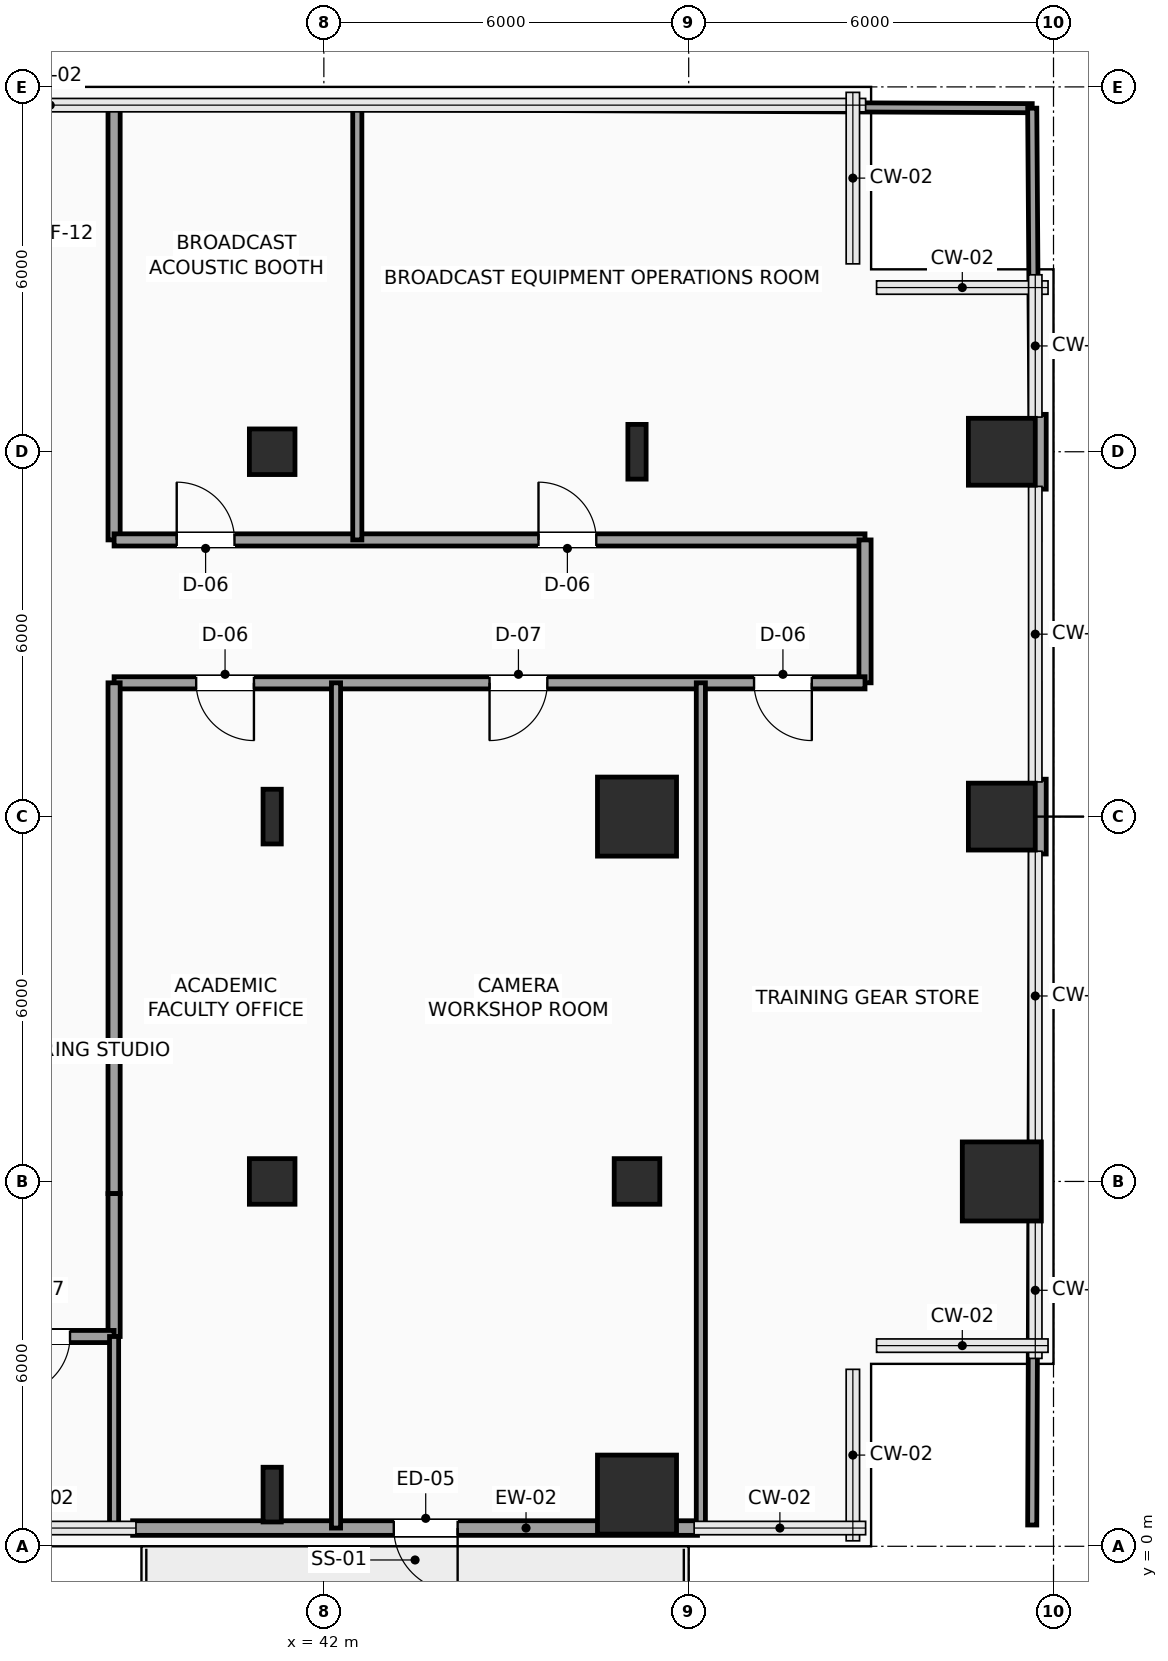
"""IFC4 building model, lengths in metres.
Left out: names, types, materials, properties, quantities, classifications, styles, units other than length and angle.
Written with IfcOpenShell. Run it as: python <this file> out.ifc"""

import sys

from ifc_helpers import new_model, si_unit, direction, frame, frame_2d, origin, origin_2d, place, context, subcontext, project, spatial, rectangle, hollow_rectangle, i_section, extrude, element, fill, save


model = new_model("IFC4")
c1 = context("Model", 3, precision=1e-05, world=origin(), true_north=direction((0.0, 1.0)))
c2 = subcontext(c1, "Body", "Model", "MODEL_VIEW")
j1 = project(units=[si_unit("LENGTHUNIT", "METRE"), si_unit("PLANEANGLEUNIT", "RADIAN")], contexts=[c1])
p1 = place(None, origin())
s1 = spatial("IfcSite", under=j1, at=p1, CompositionType="ELEMENT")
p2 = place(p1, origin())
s2 = spatial("IfcBuilding", under=s1, at=p2, CompositionType="ELEMENT")
p3 = place(p2, frame((0.0, 0.0, 59.7)))
s3 = spatial("IfcBuildingStorey", under=s2, at=p3, CompositionType="ELEMENT", Elevation=59.7)
p4 = place(p3, frame((41.15, 0.85, 0.0), z_axis=(0.0, 0.0, 1.0), x_axis=(1.0, 0.0, 0.0)))
e1 = element("IfcColumn", 1, at=p4, inside=s3, PredefinedType="COLUMN", context=c2, shape_type="SweptSolid", body=[
    extrude(i_section(OverallWidth=0.3, OverallDepth=0.9, WebThickness=0.019, FlangeThickness=0.035, FilletRadius=0.03, at=origin_2d()), origin(), (0.0, 0.0, 1.0), 3.9),
])
p5 = place(p3, frame((41.15, 6.0, 0.0), z_axis=(0.0, 0.0, 1.0), x_axis=(1.0, 0.0, 0.0)))
e2 = element("IfcColumn", 2, at=p5, inside=s3, PredefinedType="COLUMN", context=c2, shape_type="SweptSolid", body=[
    extrude(hollow_rectangle(XDim=0.75, YDim=0.75, WallThickness=0.035, InnerFilletRadius=0.035, OuterFilletRadius=0.05, at=origin_2d()), origin(), (0.0, 0.0, 1.0), 3.9),
])
p6 = place(p3, frame((41.15, 12.0, 0.0), z_axis=(0.0, 0.0, 1.0), x_axis=(1.0, 0.0, 0.0)))
e3 = element("IfcColumn", 3, at=p6, inside=s3, PredefinedType="COLUMN", context=c2, shape_type="SweptSolid", body=[
    extrude(i_section(OverallWidth=0.3, OverallDepth=0.9, WebThickness=0.019, FlangeThickness=0.035, FilletRadius=0.03, at=origin_2d()), origin(), (0.0, 0.0, 1.0), 3.9),
])
p7 = place(p3, frame((41.15, 18.0, 0.0), z_axis=(0.0, 0.0, 1.0), x_axis=(1.0, 0.0, 0.0)))
e4 = element("IfcColumn", 4, at=p7, inside=s3, PredefinedType="COLUMN", context=c2, shape_type="SweptSolid", body=[
    extrude(hollow_rectangle(XDim=0.75, YDim=0.75, WallThickness=0.035, InnerFilletRadius=0.035, OuterFilletRadius=0.05, at=origin_2d()), origin(), (0.0, 0.0, 1.0), 3.9),
])
p8 = place(p3, frame((47.15, 0.85, 0.0), z_axis=(0.0, 0.0, 1.0), x_axis=(1.0, 0.0, 0.0)))
e5 = element("IfcColumn", 5, at=p8, inside=s3, PredefinedType="COLUMN", context=c2, shape_type="SweptSolid", body=[
    extrude(rectangle(XDim=1.3, YDim=1.3, at=origin_2d()), origin(), (0.0, 0.0, 1.0), 3.9),
])
p9 = place(p3, frame((47.15, 6.0, 0.0), z_axis=(0.0, 0.0, 1.0), x_axis=(1.0, 0.0, 0.0)))
e6 = element("IfcColumn", 6, at=p9, inside=s3, PredefinedType="COLUMN", context=c2, shape_type="SweptSolid", body=[
    extrude(hollow_rectangle(XDim=0.75, YDim=0.75, WallThickness=0.035, InnerFilletRadius=0.035, OuterFilletRadius=0.05, at=origin_2d()), origin(), (0.0, 0.0, 1.0), 3.9),
])
p10 = place(p3, frame((47.15, 12.0, 0.0), z_axis=(0.0, 0.0, 1.0), x_axis=(1.0, 0.0, 0.0)))
e7 = element("IfcColumn", 7, at=p10, inside=s3, PredefinedType="COLUMN", context=c2, shape_type="SweptSolid", body=[
    extrude(rectangle(XDim=1.3, YDim=1.3, at=origin_2d()), origin(), (0.0, 0.0, 1.0), 3.9),
])
p11 = place(p3, frame((47.15, 18.0, 0.0), z_axis=(0.0, 0.0, 1.0), x_axis=(1.0, 0.0, 0.0)))
e8 = element("IfcColumn", 8, at=p11, inside=s3, PredefinedType="COLUMN", context=c2, shape_type="SweptSolid", body=[
    extrude(i_section(OverallWidth=0.3, OverallDepth=0.9, WebThickness=0.019, FlangeThickness=0.035, FilletRadius=0.03, at=origin_2d()), origin(), (0.0, 0.0, 1.0), 3.9),
])
p12 = place(p3, frame((53.15, 6.0, 0.0), z_axis=(0.0, 0.0, 1.0), x_axis=(1.0, 0.0, 0.0)))
e9 = element("IfcColumn", 9, at=p12, inside=s3, PredefinedType="COLUMN", context=c2, shape_type="SweptSolid", body=[
    extrude(rectangle(XDim=1.3, YDim=1.3, at=origin_2d()), origin(), (0.0, 0.0, 1.0), 3.9),
])
for number, where, z_axis, x_axis in (
    (10, (53.15, 12.0, 0.0), (0.0, 0.0, 1.0), (1.0, 0.0, 0.0)),
    (11, (53.15, 18.0, 0.0), (0.0, 0.0, 1.0), (1.0, 0.0, 0.0)),
):
    element("IfcColumn", number, at=place(p3, frame(where, z_axis=z_axis, x_axis=x_axis)), inside=s3, PredefinedType="COLUMN", context=c2, shape_type="SweptSolid", body=[
        extrude(rectangle(XDim=1.1, YDim=1.1, at=origin_2d()), origin(), (0.0, 0.0, 1.0), 3.9),
    ])
p13 = place(p3, frame((48.145, 0.3, 0.0), z_axis=(0.0, 0.0, 1.0), x_axis=(-1.0, 0.0, 0.0)))
e12 = element("IfcWall", 12, at=p13, inside=s3, PredefinedType="SOLIDWALL", context=c2, shape_type="SweptSolid", body=[
    extrude(rectangle(XDim=9.29, YDim=0.24, at=frame_2d((4.645, 0.0))), origin(), (0.0, 0.0, 1.0), 3.65),
])
p14 = place(p13, frame((3.945, 0.0, 0.0)))
e13 = element("IfcOpeningElement", 13, at=p14, cuts=e12, PredefinedType="OPENING", context=c2, shape_type="SweptSolid", body=[
    extrude(rectangle(XDim=1.05, YDim=2.2, at=frame_2d((0.525, 1.1))), frame((0.0, 0.13, 0.0), z_axis=(0.0, -1.0, 0.0), x_axis=(1.0, 0.0, 0.0)), (0.0, 0.0, 1.0), 0.26),
])
for number, where, z_axis, x_axis in (
    (14, (53.76, 18.615, 0.0), (0.0, 0.0, 1.0), (0.0, -1.0, 0.0)),
    (15, (53.76, 12.615, 0.0), (0.0, 0.0, 1.0), (0.0, -1.0, 0.0)),
):
    element("IfcWall", number, at=place(p3, frame(where, z_axis=z_axis, x_axis=x_axis)), inside=s3, PredefinedType="SOLIDWALL", context=c2, shape_type="SweptSolid", body=[
        extrude(rectangle(XDim=1.23, YDim=0.24, at=frame_2d((0.615, 0.0))), origin(), (0.0, 0.0, 1.0), 3.65),
    ])
p15 = place(p3, frame((38.55, 23.7, 0.0), z_axis=(0.0, 0.0, 1.0), x_axis=(0.0, -1.0, 0.0)))
e16 = element("IfcWall", 16, at=p15, inside=s3, PredefinedType="SOLIDWALL", context=c2, shape_type="SweptSolid", body=[
    extrude(rectangle(XDim=7.15, YDim=0.2, at=frame_2d((3.575, 0.0))), origin(), (0.0, 0.0, 1.0), 3.65),
])
p16 = place(p3, frame((38.55, 16.55, 0.0), z_axis=(0.0, 0.0, 1.0), x_axis=(1.0, 0.0, 0.0)))
e17 = element("IfcWall", 17, at=p16, inside=s3, PredefinedType="SOLIDWALL", context=c2, shape_type="SweptSolid", body=[
    extrude(rectangle(XDim=12.35, YDim=0.2, at=frame_2d((6.175, 0.0))), origin(), (0.0, 0.0, 1.0), 3.65),
])
p17 = place(p16, frame((1.03, 0.0, 0.0)))
e18 = element("IfcOpeningElement", 18, at=p17, cuts=e17, PredefinedType="OPENING", context=c2, shape_type="SweptSolid", body=[
    extrude(rectangle(XDim=0.95, YDim=2.15, at=frame_2d((0.475, 1.075))), frame((0.0, 0.11, 0.0), z_axis=(0.0, -1.0, 0.0), x_axis=(1.0, 0.0, 0.0)), (0.0, 0.0, 1.0), 0.22),
])
p18 = place(p16, frame((6.98, 0.0, 0.0)))
e19 = element("IfcOpeningElement", 19, at=p18, cuts=e17, PredefinedType="OPENING", context=c2, shape_type="SweptSolid", body=[
    extrude(rectangle(XDim=0.95, YDim=2.15, at=frame_2d((0.475, 1.075))), frame((0.0, 0.11, 0.0), z_axis=(0.0, -1.0, 0.0), x_axis=(1.0, 0.0, 0.0)), (0.0, 0.0, 1.0), 0.22),
])
p19 = place(p3, frame((50.9, 16.55, 0.0), z_axis=(0.0, 0.0, 1.0), x_axis=(0.0, -1.0, 0.0)))
e20 = element("IfcWall", 20, at=p19, inside=s3, PredefinedType="SOLIDWALL", context=c2, shape_type="SweptSolid", body=[
    extrude(rectangle(XDim=2.35, YDim=0.2, at=frame_2d((1.175, 0.0))), origin(), (0.0, 0.0, 1.0), 3.65),
])
p20 = place(p3, frame((50.9, 14.2, 0.0), z_axis=(0.0, 0.0, 1.0), x_axis=(-1.0, 0.0, 0.0)))
e21 = element("IfcWall", 21, at=p20, inside=s3, PredefinedType="SOLIDWALL", context=c2, shape_type="SweptSolid", body=[
    extrude(rectangle(XDim=12.35, YDim=0.2, at=frame_2d((6.175, 0.0))), origin(), (0.0, 0.0, 1.0), 3.65),
])
p21 = place(p20, frame((10.05, 0.0, 0.0)))
e22 = element("IfcOpeningElement", 22, at=p21, cuts=e21, PredefinedType="OPENING", context=c2, shape_type="SweptSolid", body=[
    extrude(rectangle(XDim=0.95, YDim=2.15, at=frame_2d((0.475, 1.075))), frame((0.0, 0.11, 0.0), z_axis=(0.0, -1.0, 0.0), x_axis=(1.0, 0.0, 0.0)), (0.0, 0.0, 1.0), 0.22),
])
p22 = place(p20, frame((5.225, 0.0, 0.0)))
e23 = element("IfcOpeningElement", 23, at=p22, cuts=e21, PredefinedType="OPENING", context=c2, shape_type="SweptSolid", body=[
    extrude(rectangle(XDim=0.95, YDim=2.15, at=frame_2d((0.475, 1.075))), frame((0.0, 0.11, 0.0), z_axis=(0.0, -1.0, 0.0), x_axis=(1.0, 0.0, 0.0)), (0.0, 0.0, 1.0), 0.22),
])
p23 = place(p20, frame((0.875, 0.0, 0.0)))
e24 = element("IfcOpeningElement", 24, at=p23, cuts=e21, PredefinedType="OPENING", context=c2, shape_type="SweptSolid", body=[
    extrude(rectangle(XDim=0.95, YDim=2.15, at=frame_2d((0.475, 1.075))), frame((0.0, 0.11, 0.0), z_axis=(0.0, -1.0, 0.0), x_axis=(1.0, 0.0, 0.0)), (0.0, 0.0, 1.0), 0.22),
])
p24 = place(p3, frame((38.55, 14.2, 0.0), z_axis=(0.0, 0.0, 1.0), x_axis=(0.0, -1.0, 0.0)))
e25 = element("IfcWall", 25, at=p24, inside=s3, PredefinedType="SOLIDWALL", context=c2, shape_type="SweptSolid", body=[
    extrude(rectangle(XDim=8.4, YDim=0.2, at=frame_2d((4.2, 0.0))), origin(), (0.0, 0.0, 1.0), 3.65),
])
p25 = place(p3, frame((38.55, 5.8, 0.0), z_axis=(0.0, 0.0, 1.0), x_axis=(0.0, -1.0, 0.0)))
e26 = element("IfcWall", 26, at=p25, inside=s3, PredefinedType="SOLIDWALL", context=c2, shape_type="SweptSolid", body=[
    extrude(rectangle(XDim=2.35, YDim=0.2, at=frame_2d((1.175, 0.0))), origin(), (0.0, 0.0, 1.0), 3.65),
])
p26 = place(p3, frame((38.55, 3.45, 0.0), z_axis=(0.0, 0.0, 1.0), x_axis=(-1.0, 0.0, 0.0)))
e27 = element("IfcWall", 27, at=p26, inside=s3, PredefinedType="SOLIDWALL", context=c2, shape_type="SweptSolid", body=[
    extrude(rectangle(XDim=2.4, YDim=0.2, at=frame_2d((1.2, 0.0))), origin(), (0.0, 0.0, 1.0), 3.142),
])
p27 = place(p26, frame((0.725, 0.0, 0.0)))
e28 = element("IfcOpeningElement", 28, at=p27, cuts=e27, PredefinedType="OPENING", context=c2, shape_type="SweptSolid", body=[
    extrude(rectangle(XDim=0.95, YDim=2.15, at=frame_2d((0.475, 1.075))), frame((0.0, 0.11, 0.0), z_axis=(0.0, -1.0, 0.0), x_axis=(1.0, 0.0, 0.0)), (0.0, 0.0, 1.0), 0.22),
])
for number, where, z_axis, x_axis in (
    (29, (42.2, 0.3, 0.0), (0.0, 0.0, 1.0), (0.0, 1.0, 0.0)),
    (30, (48.2, 0.3, 0.0), (0.0, 0.0, 1.0), (0.0, 1.0, 0.0)),
):
    element("IfcWall", number, at=place(p3, frame(where, z_axis=z_axis, x_axis=x_axis)), inside=s3, PredefinedType="PARTITIONING", context=c2, shape_type="SweptSolid", body=[
        extrude(rectangle(XDim=13.9, YDim=0.15, at=frame_2d((6.95, 0.0))), origin(), (0.0, 0.0, 1.0), 3.65),
    ])
p28 = place(p3, frame((53.65, 0.35, 0.0), z_axis=(0.0, 0.0, 1.0), x_axis=(0.003606251025, 0.999993497456, 0.0)))
e31 = element("IfcWall", 31, at=p28, inside=s3, PredefinedType="PARTITIONING", context=c2, shape_type="SweptSolid", body=[
    extrude(rectangle(XDim=11.035, YDim=0.15, at=frame_2d((5.518, 0.0))), origin(), (0.0, 0.0, 1.0), 3.65),
])
p29 = place(p3, frame((53.694, 12.615, 0.0), z_axis=(0.0, 0.0, 1.0), x_axis=(0.003542799701, 0.999993724265, 0.0)))
e32 = element("IfcWall", 32, at=p29, inside=s3, PredefinedType="PARTITIONING", context=c2, shape_type="SweptSolid", body=[
    extrude(rectangle(XDim=1.585, YDim=0.15, at=frame_2d((0.792, 0.0))), origin(), (0.0, 0.0, 1.0), 3.65),
])
p30 = place(p3, frame((42.55, 16.55, 0.0), z_axis=(0.0, 0.0, 1.0), x_axis=(0.0, 1.0, 0.0)))
e33 = element("IfcWall", 33, at=p30, inside=s3, PredefinedType="PARTITIONING", context=c2, shape_type="SweptSolid", body=[
    extrude(rectangle(XDim=7.15, YDim=0.15, at=frame_2d((3.575, 0.0))), origin(), (0.0, 0.0, 1.0), 3.65),
])
p31 = place(p3, frame((42.55, 23.7, 0.0), z_axis=(0.0, 0.0, 1.0), x_axis=(0.999989834782, -0.004508917104, 0.0)))
e34 = element("IfcWall", 34, at=p31, inside=s3, PredefinedType="PARTITIONING", context=c2, shape_type="SweptSolid", body=[
    extrude(rectangle(XDim=11.1, YDim=0.15, at=frame_2d((5.55, 0.0))), origin(), (0.0, 0.0, 1.0), 3.65),
])
p32 = place(p3, frame((53.7, 16.55, 0.0), z_axis=(0.0, 0.0, 1.0), x_axis=(-0.007017371073, 0.999975377948, 0.0)))
e35 = element("IfcWall", 35, at=p32, inside=s3, PredefinedType="PARTITIONING", context=c2, shape_type="SweptSolid", body=[
    extrude(rectangle(XDim=0.835, YDim=0.15, at=frame_2d((0.417, 0.0))), origin(), (0.0, 0.0, 1.0), 3.65),
])
p33 = place(p3, frame((53.686, 18.615, 0.0), z_axis=(0.0, 0.0, 1.0), x_axis=(-0.007079296972, 0.999974941463, 0.0)))
e36 = element("IfcWall", 36, at=p33, inside=s3, PredefinedType="PARTITIONING", context=c2, shape_type="SweptSolid", body=[
    extrude(rectangle(XDim=5.035, YDim=0.15, at=frame_2d((2.518, 0.0))), origin(), (0.0, 0.0, 1.0), 3.65),
])
p34 = place(p3, frame((38.55, 0.3, 0.0), z_axis=(0.0, 0.0, 1.0), x_axis=(0.0, 1.0, 0.0)))
e37 = element("IfcWall", 37, at=p34, inside=s3, PredefinedType="PARTITIONING", context=c2, shape_type="SweptSolid", body=[
    extrude(rectangle(XDim=3.15, YDim=0.15, at=frame_2d((1.575, 0.0))), origin(), (0.0, 0.0, 1.0), 3.65),
])
p35 = place(p14, origin())
e38 = element("IfcDoor", 38, at=p35, inside=s3, OperationType="SINGLE_SWING_LEFT", PredefinedType="DOOR", context=c2, shape_type="SweptSolid", body=[
    extrude(rectangle(XDim=1.05, YDim=2.2, at=frame_2d((0.525, 1.1))), frame((0.0, 0.025, 0.0), z_axis=(0.0, -1.0, 0.0), x_axis=(1.0, 0.0, 0.0)), (0.0, 0.0, 1.0), 0.05),
])
fill(e13, e38)
p36 = place(p17, origin())
e39 = element("IfcDoor", 39, at=p36, inside=s3, OperationType="SINGLE_SWING_LEFT", PredefinedType="DOOR", context=c2, shape_type="SweptSolid", body=[
    extrude(rectangle(XDim=0.95, YDim=2.15, at=frame_2d((0.475, 1.075))), frame((0.0, 0.025, 0.0), z_axis=(0.0, -1.0, 0.0), x_axis=(1.0, 0.0, 0.0)), (0.0, 0.0, 1.0), 0.05),
])
fill(e18, e39)
p37 = place(p18, origin())
e40 = element("IfcDoor", 40, at=p37, inside=s3, OperationType="SINGLE_SWING_LEFT", PredefinedType="DOOR", context=c2, shape_type="SweptSolid", body=[
    extrude(rectangle(XDim=0.95, YDim=2.15, at=frame_2d((0.475, 1.075))), frame((0.0, 0.025, 0.0), z_axis=(0.0, -1.0, 0.0), x_axis=(1.0, 0.0, 0.0)), (0.0, 0.0, 1.0), 0.05),
])
fill(e19, e40)
p38 = place(p21, origin())
e41 = element("IfcDoor", 41, at=p38, inside=s3, OperationType="SINGLE_SWING_LEFT", PredefinedType="DOOR", context=c2, shape_type="SweptSolid", body=[
    extrude(rectangle(XDim=0.95, YDim=2.15, at=frame_2d((0.475, 1.075))), frame((0.0, 0.025, 0.0), z_axis=(0.0, -1.0, 0.0), x_axis=(1.0, 0.0, 0.0)), (0.0, 0.0, 1.0), 0.05),
])
fill(e22, e41)
p39 = place(p22, origin())
e42 = element("IfcDoor", 42, at=p39, inside=s3, OperationType="SINGLE_SWING_RIGHT", PredefinedType="DOOR", context=c2, shape_type="SweptSolid", body=[
    extrude(rectangle(XDim=0.95, YDim=2.15, at=frame_2d((0.475, 1.075))), frame((0.0, 0.025, 0.0), z_axis=(0.0, -1.0, 0.0), x_axis=(1.0, 0.0, 0.0)), (0.0, 0.0, 1.0), 0.05),
])
fill(e23, e42)
p40 = place(p23, origin())
e43 = element("IfcDoor", 43, at=p40, inside=s3, OperationType="SINGLE_SWING_LEFT", PredefinedType="DOOR", context=c2, shape_type="SweptSolid", body=[
    extrude(rectangle(XDim=0.95, YDim=2.15, at=frame_2d((0.475, 1.075))), frame((0.0, 0.025, 0.0), z_axis=(0.0, -1.0, 0.0), x_axis=(1.0, 0.0, 0.0)), (0.0, 0.0, 1.0), 0.05),
])
fill(e24, e43)
p41 = place(p27, origin())
e44 = element("IfcDoor", 44, at=p41, inside=s3, OperationType="SINGLE_SWING_RIGHT", PredefinedType="DOOR", context=c2, shape_type="SweptSolid", body=[
    extrude(rectangle(XDim=0.95, YDim=2.15, at=frame_2d((0.475, 1.075))), frame((0.0, 0.025, 0.0), z_axis=(0.0, -1.0, 0.0), x_axis=(1.0, 0.0, 0.0)), (0.0, 0.0, 1.0), 0.05),
])
fill(e28, e44)
save(model, sys.argv[1])
